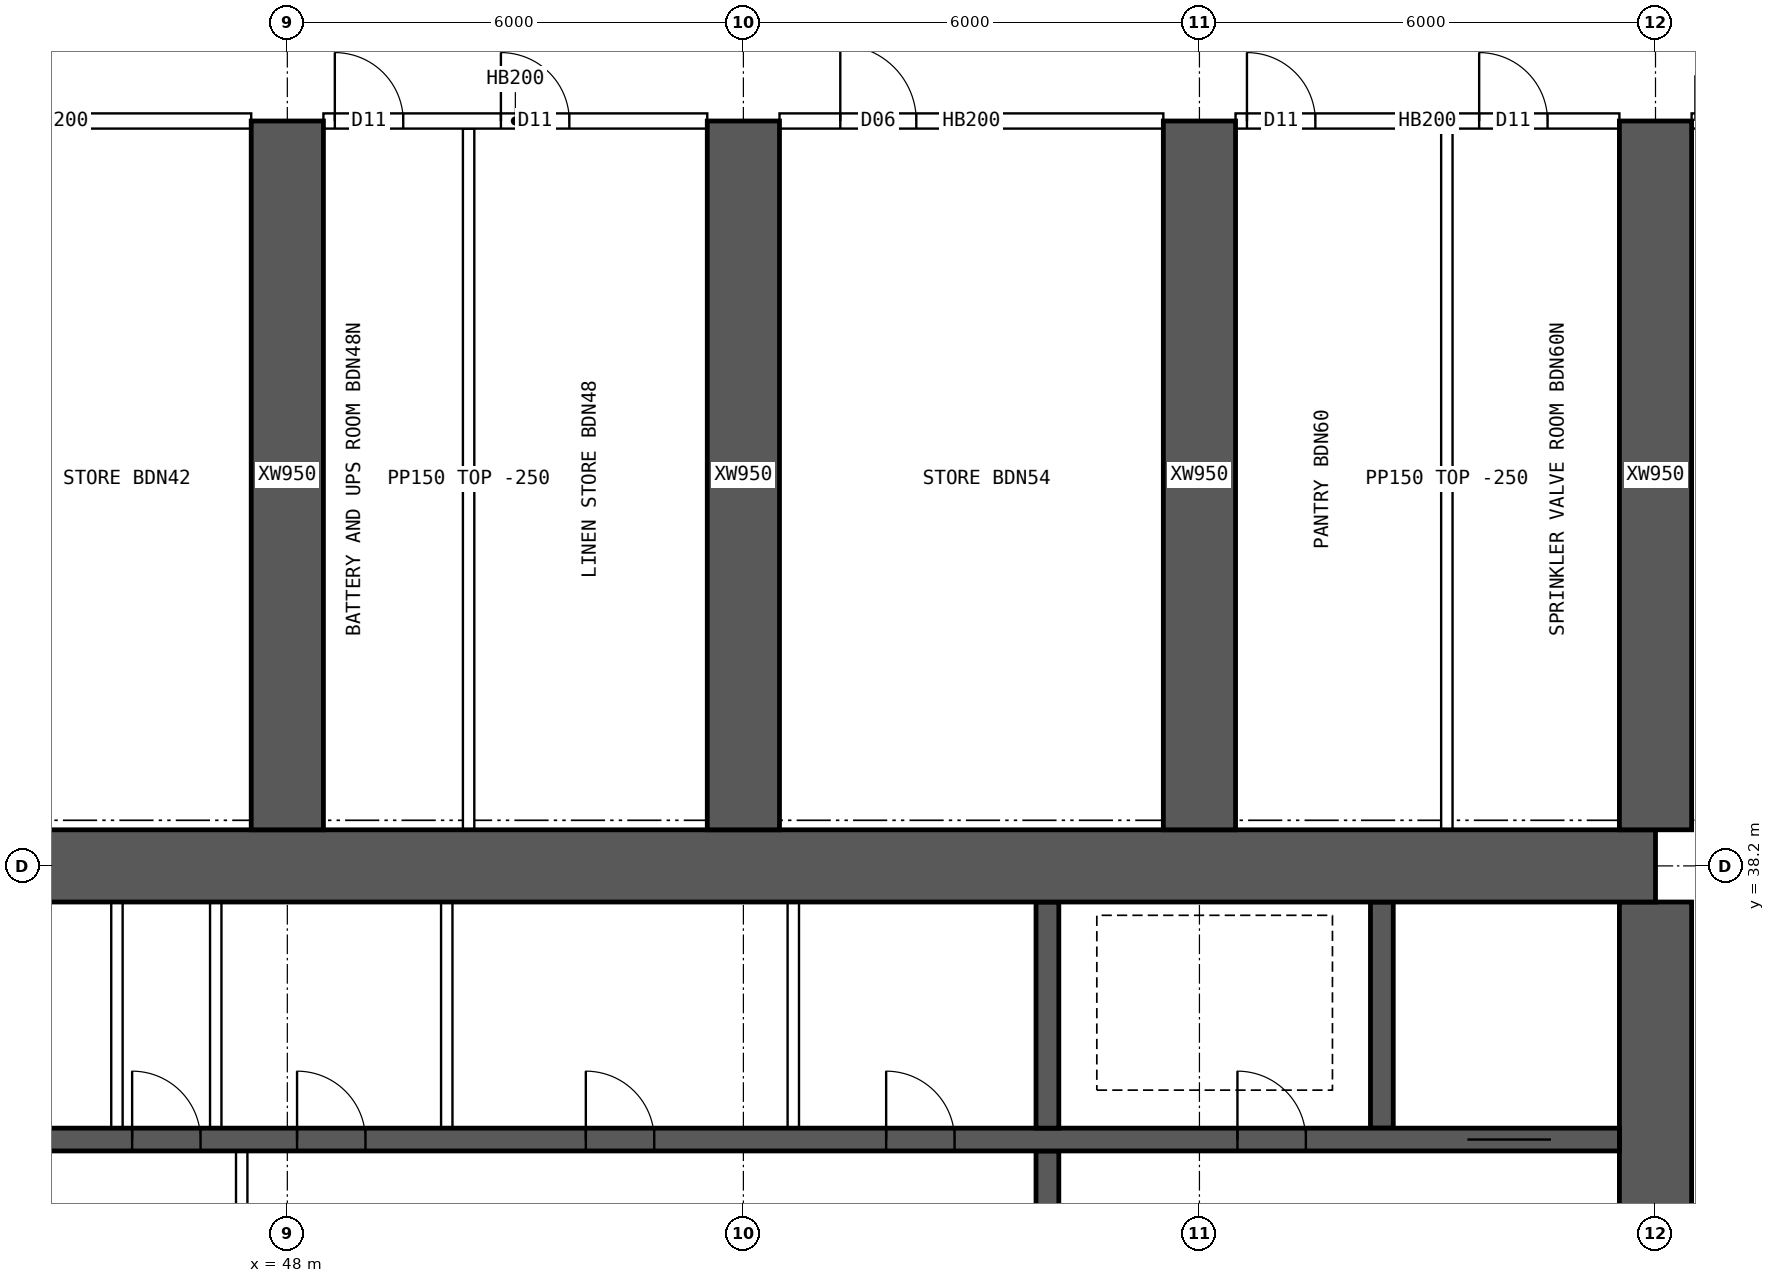
"""IFC4 building model, lengths in metres.
Left out: names, types, materials, properties, quantities, classifications, styles, units other than length and angle.
Written with IfcOpenShell. Run it as: python <this file> out.ifc"""

import sys

from ifc_helpers import new_model, si_unit, direction, frame, frame_2d, origin, place, context, subcontext, project, spatial, rectangle, extrude, element, fill, save


model = new_model("IFC4")
c1 = context("Model", 3, precision=1e-05, world=origin(), true_north=direction((0.0, 1.0)))
c2 = subcontext(c1, "Body", "Model", "MODEL_VIEW")
j1 = project(units=[si_unit("LENGTHUNIT", "METRE"), si_unit("PLANEANGLEUNIT", "RADIAN")], contexts=[c1])
p1 = place(None, origin())
s1 = spatial("IfcSite", under=j1, at=p1, CompositionType="ELEMENT")
p2 = place(p1, origin())
s2 = spatial("IfcBuilding", under=s1, at=p2, CompositionType="ELEMENT")
p3 = place(p2, frame((0.0, 0.0, 99.4)))
s3 = spatial("IfcBuildingStorey", under=s2, at=p3, CompositionType="ELEMENT", Elevation=99.4)
p4 = place(p3, frame((18.0, 38.2, 0.0), z_axis=(0.0, 0.0, 1.0), x_axis=(1.0, 0.0, 0.0)))
e1 = element("IfcWall", 1, at=p4, inside=s3, PredefinedType="SHEAR", context=c2, shape_type="SweptSolid", body=[
    extrude(rectangle(XDim=48.0, YDim=0.95, at=frame_2d((24.0, 0.0))), origin(), (0.0, 0.0, 1.0), 3.75),
])
p5 = place(p3, frame((66.0, 26.275, 0.0), z_axis=(0.0, 0.0, 1.0), x_axis=(0.0, 1.0, 0.0)))
e2 = element("IfcWall", 2, at=p5, inside=s3, PredefinedType="SHEAR", context=c2, shape_type="SweptSolid", body=[
    extrude(rectangle(XDim=11.45, YDim=0.95, at=frame_2d((5.725, 0.0))), origin(), (0.0, 0.0, 1.0), 3.75),
])
p6 = place(p5, frame((5.025, 0.0, 0.0)))
e3 = element("IfcOpeningElement", 3, at=p6, cuts=e2, PredefinedType="OPENING", context=c2, shape_type="SweptSolid", body=[
    extrude(rectangle(XDim=1.2, YDim=2.1, at=frame_2d((0.6, 1.05))), frame((0.0, 0.485, 0.0), z_axis=(0.0, -1.0, 0.0), x_axis=(1.0, 0.0, 0.0)), (0.0, 0.0, 1.0), 0.97),
])
p7 = place(p3, frame((18.475, 34.6, 0.0), z_axis=(0.0, 0.0, 1.0), x_axis=(1.0, 0.0, 0.0)))
e4 = element("IfcWall", 4, at=p7, inside=s3, PredefinedType="SHEAR", context=c2, shape_type="SweptSolid", body=[
    extrude(rectangle(XDim=47.05, YDim=0.3, at=frame_2d((23.525, 0.0))), origin(), (0.0, 0.0, 1.0), 3.75),
])
p8 = place(p7, frame((0.9, 0.0, 0.0)))
e5 = element("IfcOpeningElement", 5, at=p8, cuts=e4, PredefinedType="OPENING", context=c2, shape_type="SweptSolid", body=[
    extrude(rectangle(XDim=1.1, YDim=2.1, at=frame_2d((0.55, 1.05))), frame((0.0, 0.16, 0.0), z_axis=(0.0, -1.0, 0.0), x_axis=(1.0, 0.0, 0.0)), (0.0, 0.0, 1.0), 0.32),
])
p9 = place(p7, frame((45.05, 0.0, 0.0)))
e6 = element("IfcOpeningElement", 6, at=p9, cuts=e4, PredefinedType="OPENING", context=c2, shape_type="SweptSolid", body=[
    extrude(rectangle(XDim=1.1, YDim=2.1, at=frame_2d((0.55, 1.05))), frame((0.0, 0.16, 0.0), z_axis=(0.0, -1.0, 0.0), x_axis=(1.0, 0.0, 0.0)), (0.0, 0.0, 1.0), 0.32),
])
p10 = place(p7, frame((4.125, 0.0, 0.0)))
e7 = element("IfcOpeningElement", 7, at=p10, cuts=e4, PredefinedType="OPENING", context=c2, shape_type="SweptSolid", body=[
    extrude(rectangle(XDim=0.9, YDim=2.1, at=frame_2d((0.45, 1.05))), frame((0.0, 0.16, 0.0), z_axis=(0.0, -1.0, 0.0), x_axis=(1.0, 0.0, 0.0)), (0.0, 0.0, 1.0), 0.32),
])
p11 = place(p7, frame((42.025, 0.0, 0.0)))
e8 = element("IfcOpeningElement", 8, at=p11, cuts=e4, PredefinedType="OPENING", context=c2, shape_type="SweptSolid", body=[
    extrude(rectangle(XDim=0.9, YDim=2.1, at=frame_2d((0.45, 1.05))), frame((0.0, 0.16, 0.0), z_axis=(0.0, -1.0, 0.0), x_axis=(1.0, 0.0, 0.0)), (0.0, 0.0, 1.0), 0.32),
])
p12 = place(p7, frame((8.9, 0.0, 0.0)))
e9 = element("IfcOpeningElement", 9, at=p12, cuts=e4, PredefinedType="OPENING", context=c2, shape_type="SweptSolid", body=[
    extrude(rectangle(XDim=0.9, YDim=2.1, at=frame_2d((0.45, 1.05))), frame((0.0, 0.16, 0.0), z_axis=(0.0, -1.0, 0.0), x_axis=(1.0, 0.0, 0.0)), (0.0, 0.0, 1.0), 0.32),
])
p13 = place(p7, frame((12.874, 0.0, 0.0)))
e10 = element("IfcOpeningElement", 10, at=p13, cuts=e4, PredefinedType="OPENING", context=c2, shape_type="SweptSolid", body=[
    extrude(rectangle(XDim=0.9, YDim=2.1, at=frame_2d((0.45, 1.05))), frame((0.0, 0.16, 0.0), z_axis=(0.0, -1.0, 0.0), x_axis=(1.0, 0.0, 0.0)), (0.0, 0.0, 1.0), 0.32),
])
p14 = place(p7, frame((16.521, 0.0, 0.0)))
e11 = element("IfcOpeningElement", 11, at=p14, cuts=e4, PredefinedType="OPENING", context=c2, shape_type="SweptSolid", body=[
    extrude(rectangle(XDim=0.9, YDim=2.1, at=frame_2d((0.45, 1.05))), frame((0.0, 0.16, 0.0), z_axis=(0.0, -1.0, 0.0), x_axis=(1.0, 0.0, 0.0)), (0.0, 0.0, 1.0), 0.32),
])
p15 = place(p7, frame((20.28, 0.0, 0.0)))
e12 = element("IfcOpeningElement", 12, at=p15, cuts=e4, PredefinedType="OPENING", context=c2, shape_type="SweptSolid", body=[
    extrude(rectangle(XDim=0.9, YDim=2.1, at=frame_2d((0.45, 1.05))), frame((0.0, 0.16, 0.0), z_axis=(0.0, -1.0, 0.0), x_axis=(1.0, 0.0, 0.0)), (0.0, 0.0, 1.0), 0.32),
])
p16 = place(p7, frame((24.686, 0.0, 0.0)))
e13 = element("IfcOpeningElement", 13, at=p16, cuts=e4, PredefinedType="OPENING", context=c2, shape_type="SweptSolid", body=[
    extrude(rectangle(XDim=0.9, YDim=2.1, at=frame_2d((0.45, 1.05))), frame((0.0, 0.16, 0.0), z_axis=(0.0, -1.0, 0.0), x_axis=(1.0, 0.0, 0.0)), (0.0, 0.0, 1.0), 0.32),
])
p17 = place(p7, frame((27.483, 0.0, 0.0)))
e14 = element("IfcOpeningElement", 14, at=p17, cuts=e4, PredefinedType="OPENING", context=c2, shape_type="SweptSolid", body=[
    extrude(rectangle(XDim=0.9, YDim=2.1, at=frame_2d((0.45, 1.05))), frame((0.0, 0.16, 0.0), z_axis=(0.0, -1.0, 0.0), x_axis=(1.0, 0.0, 0.0)), (0.0, 0.0, 1.0), 0.32),
])
p18 = place(p7, frame((29.653, 0.0, 0.0)))
e15 = element("IfcOpeningElement", 15, at=p18, cuts=e4, PredefinedType="OPENING", context=c2, shape_type="SweptSolid", body=[
    extrude(rectangle(XDim=0.9, YDim=2.1, at=frame_2d((0.45, 1.05))), frame((0.0, 0.16, 0.0), z_axis=(0.0, -1.0, 0.0), x_axis=(1.0, 0.0, 0.0)), (0.0, 0.0, 1.0), 0.32),
])
p19 = place(p7, frame((33.452, 0.0, 0.0)))
e16 = element("IfcOpeningElement", 16, at=p19, cuts=e4, PredefinedType="OPENING", context=c2, shape_type="SweptSolid", body=[
    extrude(rectangle(XDim=0.9, YDim=2.1, at=frame_2d((0.45, 1.05))), frame((0.0, 0.16, 0.0), z_axis=(0.0, -1.0, 0.0), x_axis=(1.0, 0.0, 0.0)), (0.0, 0.0, 1.0), 0.32),
])
p20 = place(p7, frame((37.403, 0.0, 0.0)))
e17 = element("IfcOpeningElement", 17, at=p20, cuts=e4, PredefinedType="OPENING", context=c2, shape_type="SweptSolid", body=[
    extrude(rectangle(XDim=0.9, YDim=2.1, at=frame_2d((0.45, 1.05))), frame((0.0, 0.16, 0.0), z_axis=(0.0, -1.0, 0.0), x_axis=(1.0, 0.0, 0.0)), (0.0, 0.0, 1.0), 0.32),
])
p21 = place(p3, frame((58.0, 30.55, 0.0), z_axis=(0.0, 0.0, 1.0), x_axis=(0.0, 1.0, 0.0)))
e18 = element("IfcWall", 18, at=p21, inside=s3, PredefinedType="SHEAR", context=c2, shape_type="SweptSolid", body=[
    extrude(rectangle(XDim=3.9, YDim=0.3, at=frame_2d((1.95, 0.0))), origin(), (0.0, 0.0, 1.0), 3.75),
])
p22 = place(p21, frame((1.4, 0.0, 0.0)))
e19 = element("IfcOpeningElement", 19, at=p22, cuts=e18, PredefinedType="OPENING", context=c2, shape_type="SweptSolid", body=[
    extrude(rectangle(XDim=1.2, YDim=2.1, at=frame_2d((0.6, 1.05))), frame((0.0, 0.16, 0.0), z_axis=(0.0, -1.0, 0.0), x_axis=(1.0, 0.0, 0.0)), (0.0, 0.0, 1.0), 0.32),
])
for number, where, z_axis, x_axis in (
    (20, (62.4, 34.75, 0.0), (0.0, 0.0, 1.0), (0.0, 1.0, 0.0)),
    (21, (58.0, 34.75, 0.0), (0.0, 0.0, 1.0), (0.0, 1.0, 0.0)),
):
    element("IfcWall", number, at=place(p3, frame(where, z_axis=z_axis, x_axis=x_axis)), inside=s3, PredefinedType="SHEAR", context=c2, shape_type="SweptSolid", body=[
        extrude(rectangle(XDim=2.975, YDim=0.3, at=frame_2d((1.488, 0.0))), origin(), (0.0, 0.0, 1.0), 3.75),
    ])
for number, where, z_axis, x_axis in (
    (22, (48.0, 38.675, 0.0), (0.0, 0.0, 1.0), (0.0, 1.0, 0.0)),
    (23, (54.0, 38.675, 0.0), (0.0, 0.0, 1.0), (0.0, 1.0, 0.0)),
    (24, (60.0, 38.675, 0.0), (0.0, 0.0, 1.0), (0.0, 1.0, 0.0)),
    (25, (66.0, 38.675, 0.0), (0.0, 0.0, 1.0), (0.0, 1.0, 0.0)),
):
    element("IfcWall", number, at=place(p3, frame(where, z_axis=z_axis, x_axis=x_axis)), inside=s3, PredefinedType="SHEAR", context=c2, shape_type="SweptSolid", body=[
        extrude(rectangle(XDim=9.325, YDim=0.95, at=frame_2d((4.663, 0.0))), origin(), (0.0, 0.0, 1.0), 3.75),
    ])
p23 = place(p3, frame((47.4, 30.55, 0.0), z_axis=(0.0, 0.0, 1.0), x_axis=(0.0, 1.0, 0.0)))
e26 = element("IfcWall", 26, at=p23, inside=s3, PredefinedType="SOLIDWALL", context=c2, shape_type="SweptSolid", body=[
    extrude(rectangle(XDim=3.9, YDim=0.15, at=frame_2d((1.95, 0.0))), origin(), (0.0, 0.0, 1.0), 3.5),
])
p24 = place(p23, frame((1.15, 0.0, 0.0)))
e27 = element("IfcOpeningElement", 27, at=p24, cuts=e26, PredefinedType="OPENING", context=c2, shape_type="SweptSolid", body=[
    extrude(rectangle(XDim=1.6, YDim=2.1, at=frame_2d((0.8, 1.05))), frame((0.0, 0.085, 0.0), z_axis=(0.0, -1.0, 0.0), x_axis=(1.0, 0.0, 0.0)), (0.0, 0.0, 1.0), 0.17),
])
for number, where, z_axis, x_axis in (
    (28, (45.758, 34.75, 0.0), (0.0, 0.0, 1.0), (0.0, 1.0, 0.0)),
    (29, (47.058, 34.75, 0.0), (0.0, 0.0, 1.0), (0.0, 1.0, 0.0)),
    (30, (50.098, 34.75, 0.0), (0.0, 0.0, 1.0), (0.0, 1.0, 0.0)),
    (31, (54.657, 34.75, 0.0), (0.0, 0.0, 1.0), (0.0, 1.0, 0.0)),
):
    element("IfcWall", number, at=place(p3, frame(where, z_axis=z_axis, x_axis=x_axis)), inside=s3, PredefinedType="SOLIDWALL", context=c2, shape_type="SweptSolid", body=[
        extrude(rectangle(XDim=2.975, YDim=0.15, at=frame_2d((1.488, 0.0))), origin(), (0.0, 0.0, 1.0), 3.5),
    ])
p25 = place(p3, frame((42.475, 48.0, 0.0), z_axis=(0.0, 0.0, 1.0), x_axis=(1.0, 0.0, 0.0)))
e32 = element("IfcWall", 32, at=p25, inside=s3, PredefinedType="SOLIDWALL", context=c2, shape_type="SweptSolid", body=[
    extrude(rectangle(XDim=5.05, YDim=0.2, at=frame_2d((2.525, 0.0))), origin(), (0.0, 0.0, 1.0), 3.5),
])
p26 = place(p25, frame((0.8, 0.0, 0.0)))
e33 = element("IfcOpeningElement", 33, at=p26, cuts=e32, PredefinedType="OPENING", context=c2, shape_type="SweptSolid", body=[
    extrude(rectangle(XDim=1.0, YDim=2.1, at=frame_2d((0.5, 1.05))), frame((0.0, 0.11, 0.0), z_axis=(0.0, -1.0, 0.0), x_axis=(1.0, 0.0, 0.0)), (0.0, 0.0, 1.0), 0.22),
])
p27 = place(p3, frame((48.475, 48.0, 0.0), z_axis=(0.0, 0.0, 1.0), x_axis=(1.0, 0.0, 0.0)))
e34 = element("IfcWall", 34, at=p27, inside=s3, PredefinedType="SOLIDWALL", context=c2, shape_type="SweptSolid", body=[
    extrude(rectangle(XDim=5.05, YDim=0.2, at=frame_2d((2.525, 0.0))), origin(), (0.0, 0.0, 1.0), 3.5),
])
p28 = place(p27, frame((0.15, 0.0, 0.0)))
e35 = element("IfcOpeningElement", 35, at=p28, cuts=e34, PredefinedType="OPENING", context=c2, shape_type="SweptSolid", body=[
    extrude(rectangle(XDim=0.9, YDim=2.1, at=frame_2d((0.45, 1.05))), frame((0.0, 0.11, 0.0), z_axis=(0.0, -1.0, 0.0), x_axis=(1.0, 0.0, 0.0)), (0.0, 0.0, 1.0), 0.22),
])
p29 = place(p27, frame((2.335, 0.0, 0.0)))
e36 = element("IfcOpeningElement", 36, at=p29, cuts=e34, PredefinedType="OPENING", context=c2, shape_type="SweptSolid", body=[
    extrude(rectangle(XDim=0.9, YDim=2.1, at=frame_2d((0.45, 1.05))), frame((0.0, 0.11, 0.0), z_axis=(0.0, -1.0, 0.0), x_axis=(1.0, 0.0, 0.0)), (0.0, 0.0, 1.0), 0.22),
])
p30 = place(p3, frame((54.475, 48.0, 0.0), z_axis=(0.0, 0.0, 1.0), x_axis=(1.0, 0.0, 0.0)))
e37 = element("IfcWall", 37, at=p30, inside=s3, PredefinedType="SOLIDWALL", context=c2, shape_type="SweptSolid", body=[
    extrude(rectangle(XDim=5.05, YDim=0.2, at=frame_2d((2.525, 0.0))), origin(), (0.0, 0.0, 1.0), 3.5),
])
p31 = place(p30, frame((0.8, 0.0, 0.0)))
e38 = element("IfcOpeningElement", 38, at=p31, cuts=e37, PredefinedType="OPENING", context=c2, shape_type="SweptSolid", body=[
    extrude(rectangle(XDim=1.0, YDim=2.1, at=frame_2d((0.5, 1.05))), frame((0.0, 0.11, 0.0), z_axis=(0.0, -1.0, 0.0), x_axis=(1.0, 0.0, 0.0)), (0.0, 0.0, 1.0), 0.22),
])
p32 = place(p3, frame((60.475, 48.0, 0.0), z_axis=(0.0, 0.0, 1.0), x_axis=(1.0, 0.0, 0.0)))
e39 = element("IfcWall", 39, at=p32, inside=s3, PredefinedType="SOLIDWALL", context=c2, shape_type="SweptSolid", body=[
    extrude(rectangle(XDim=5.05, YDim=0.2, at=frame_2d((2.525, 0.0))), origin(), (0.0, 0.0, 1.0), 3.5),
])
p33 = place(p32, frame((0.15, 0.0, 0.0)))
e40 = element("IfcOpeningElement", 40, at=p33, cuts=e39, PredefinedType="OPENING", context=c2, shape_type="SweptSolid", body=[
    extrude(rectangle(XDim=0.9, YDim=2.1, at=frame_2d((0.45, 1.05))), frame((0.0, 0.11, 0.0), z_axis=(0.0, -1.0, 0.0), x_axis=(1.0, 0.0, 0.0)), (0.0, 0.0, 1.0), 0.22),
])
p34 = place(p32, frame((3.205, 0.0, 0.0)))
e41 = element("IfcOpeningElement", 41, at=p34, cuts=e39, PredefinedType="OPENING", context=c2, shape_type="SweptSolid", body=[
    extrude(rectangle(XDim=0.9, YDim=2.1, at=frame_2d((0.45, 1.05))), frame((0.0, 0.11, 0.0), z_axis=(0.0, -1.0, 0.0), x_axis=(1.0, 0.0, 0.0)), (0.0, 0.0, 1.0), 0.22),
])
p35 = place(p3, frame((66.475, 48.0, 0.0), z_axis=(0.0, 0.0, 1.0), x_axis=(1.0, 0.0, 0.0)))
e42 = element("IfcWall", 42, at=p35, inside=s3, PredefinedType="SOLIDWALL", context=c2, shape_type="SweptSolid", body=[
    extrude(rectangle(XDim=1.925, YDim=0.2, at=frame_2d((0.962, 0.0))), origin(), (0.0, 0.0, 1.0), 3.5),
])
p36 = place(p35, frame((0.05, 0.0, 0.0)))
e43 = element("IfcOpeningElement", 43, at=p36, cuts=e42, PredefinedType="OPENING", context=c2, shape_type="SweptSolid", body=[
    extrude(rectangle(XDim=1.2, YDim=2.1, at=frame_2d((0.6, 1.05))), frame((0.0, 0.11, 0.0), z_axis=(0.0, -1.0, 0.0), x_axis=(1.0, 0.0, 0.0)), (0.0, 0.0, 1.0), 0.22),
])
for number, where, z_axis, x_axis in (
    (44, (50.385, 38.675, 0.0), (0.0, 0.0, 1.0), (0.0, 1.0, 0.0)),
    (45, (63.255, 38.675, 0.0), (0.0, 0.0, 1.0), (0.0, 1.0, 0.0)),
):
    element("IfcWall", number, at=place(p3, frame(where, z_axis=z_axis, x_axis=x_axis)), inside=s3, PredefinedType="PARTITIONING", context=c2, shape_type="SweptSolid", body=[
        extrude(rectangle(XDim=9.225, YDim=0.15, at=frame_2d((4.612, 0.0))), origin(), (0.0, 0.0, 1.0), 3.5),
    ])
p37 = place(p9, origin())
e46 = element("IfcDoor", 46, at=p37, inside=s3, OperationType="DOUBLE_DOOR_SLIDING", PredefinedType="DOOR", context=c2, shape_type="SweptSolid", body=[
    extrude(rectangle(XDim=1.1, YDim=2.1, at=frame_2d((0.55, 1.05))), frame((0.0, 0.025, 0.0), z_axis=(0.0, -1.0, 0.0), x_axis=(1.0, 0.0, 0.0)), (0.0, 0.0, 1.0), 0.05),
])
fill(e6, e46)
p38 = place(p11, origin())
e47 = element("IfcDoor", 47, at=p38, inside=s3, OperationType="SINGLE_SWING_LEFT", PredefinedType="DOOR", context=c2, shape_type="SweptSolid", body=[
    extrude(rectangle(XDim=0.9, YDim=2.1, at=frame_2d((0.45, 1.05))), frame((0.0, 0.025, 0.0), z_axis=(0.0, -1.0, 0.0), x_axis=(1.0, 0.0, 0.0)), (0.0, 0.0, 1.0), 0.05),
])
fill(e8, e47)
p39 = place(p17, origin())
e48 = element("IfcDoor", 48, at=p39, inside=s3, OperationType="SINGLE_SWING_LEFT", PredefinedType="DOOR", context=c2, shape_type="SweptSolid", body=[
    extrude(rectangle(XDim=0.9, YDim=2.1, at=frame_2d((0.45, 1.05))), frame((0.0, 0.025, 0.0), z_axis=(0.0, -1.0, 0.0), x_axis=(1.0, 0.0, 0.0)), (0.0, 0.0, 1.0), 0.05),
])
fill(e14, e48)
p40 = place(p18, origin())
e49 = element("IfcDoor", 49, at=p40, inside=s3, OperationType="SINGLE_SWING_LEFT", PredefinedType="DOOR", context=c2, shape_type="SweptSolid", body=[
    extrude(rectangle(XDim=0.9, YDim=2.1, at=frame_2d((0.45, 1.05))), frame((0.0, 0.025, 0.0), z_axis=(0.0, -1.0, 0.0), x_axis=(1.0, 0.0, 0.0)), (0.0, 0.0, 1.0), 0.05),
])
fill(e15, e49)
p41 = place(p19, origin())
e50 = element("IfcDoor", 50, at=p41, inside=s3, OperationType="SINGLE_SWING_LEFT", PredefinedType="DOOR", context=c2, shape_type="SweptSolid", body=[
    extrude(rectangle(XDim=0.9, YDim=2.1, at=frame_2d((0.45, 1.05))), frame((0.0, 0.025, 0.0), z_axis=(0.0, -1.0, 0.0), x_axis=(1.0, 0.0, 0.0)), (0.0, 0.0, 1.0), 0.05),
])
fill(e16, e50)
p42 = place(p20, origin())
e51 = element("IfcDoor", 51, at=p42, inside=s3, OperationType="SINGLE_SWING_LEFT", PredefinedType="DOOR", context=c2, shape_type="SweptSolid", body=[
    extrude(rectangle(XDim=0.9, YDim=2.1, at=frame_2d((0.45, 1.05))), frame((0.0, 0.025, 0.0), z_axis=(0.0, -1.0, 0.0), x_axis=(1.0, 0.0, 0.0)), (0.0, 0.0, 1.0), 0.05),
])
fill(e17, e51)
p43 = place(p28, origin())
e52 = element("IfcDoor", 52, at=p43, inside=s3, OperationType="SINGLE_SWING_LEFT", PredefinedType="DOOR", context=c2, shape_type="SweptSolid", body=[
    extrude(rectangle(XDim=0.9, YDim=2.1, at=frame_2d((0.45, 1.05))), frame((0.0, 0.025, 0.0), z_axis=(0.0, -1.0, 0.0), x_axis=(1.0, 0.0, 0.0)), (0.0, 0.0, 1.0), 0.05),
])
fill(e35, e52)
p44 = place(p29, origin())
e53 = element("IfcDoor", 53, at=p44, inside=s3, OperationType="SINGLE_SWING_LEFT", PredefinedType="DOOR", context=c2, shape_type="SweptSolid", body=[
    extrude(rectangle(XDim=0.9, YDim=2.1, at=frame_2d((0.45, 1.05))), frame((0.0, 0.025, 0.0), z_axis=(0.0, -1.0, 0.0), x_axis=(1.0, 0.0, 0.0)), (0.0, 0.0, 1.0), 0.05),
])
fill(e36, e53)
p45 = place(p31, origin())
e54 = element("IfcDoor", 54, at=p45, inside=s3, OperationType="SINGLE_SWING_LEFT", PredefinedType="DOOR", context=c2, shape_type="SweptSolid", body=[
    extrude(rectangle(XDim=1.0, YDim=2.1, at=frame_2d((0.5, 1.05))), frame((0.0, 0.025, 0.0), z_axis=(0.0, -1.0, 0.0), x_axis=(1.0, 0.0, 0.0)), (0.0, 0.0, 1.0), 0.05),
])
fill(e38, e54)
p46 = place(p33, origin())
e55 = element("IfcDoor", 55, at=p46, inside=s3, OperationType="SINGLE_SWING_LEFT", PredefinedType="DOOR", context=c2, shape_type="SweptSolid", body=[
    extrude(rectangle(XDim=0.9, YDim=2.1, at=frame_2d((0.45, 1.05))), frame((0.0, 0.025, 0.0), z_axis=(0.0, -1.0, 0.0), x_axis=(1.0, 0.0, 0.0)), (0.0, 0.0, 1.0), 0.05),
])
fill(e40, e55)
p47 = place(p34, origin())
e56 = element("IfcDoor", 56, at=p47, inside=s3, OperationType="SINGLE_SWING_LEFT", PredefinedType="DOOR", context=c2, shape_type="SweptSolid", body=[
    extrude(rectangle(XDim=0.9, YDim=2.1, at=frame_2d((0.45, 1.05))), frame((0.0, 0.025, 0.0), z_axis=(0.0, -1.0, 0.0), x_axis=(1.0, 0.0, 0.0)), (0.0, 0.0, 1.0), 0.05),
])
fill(e41, e56)
save(model, sys.argv[1])
